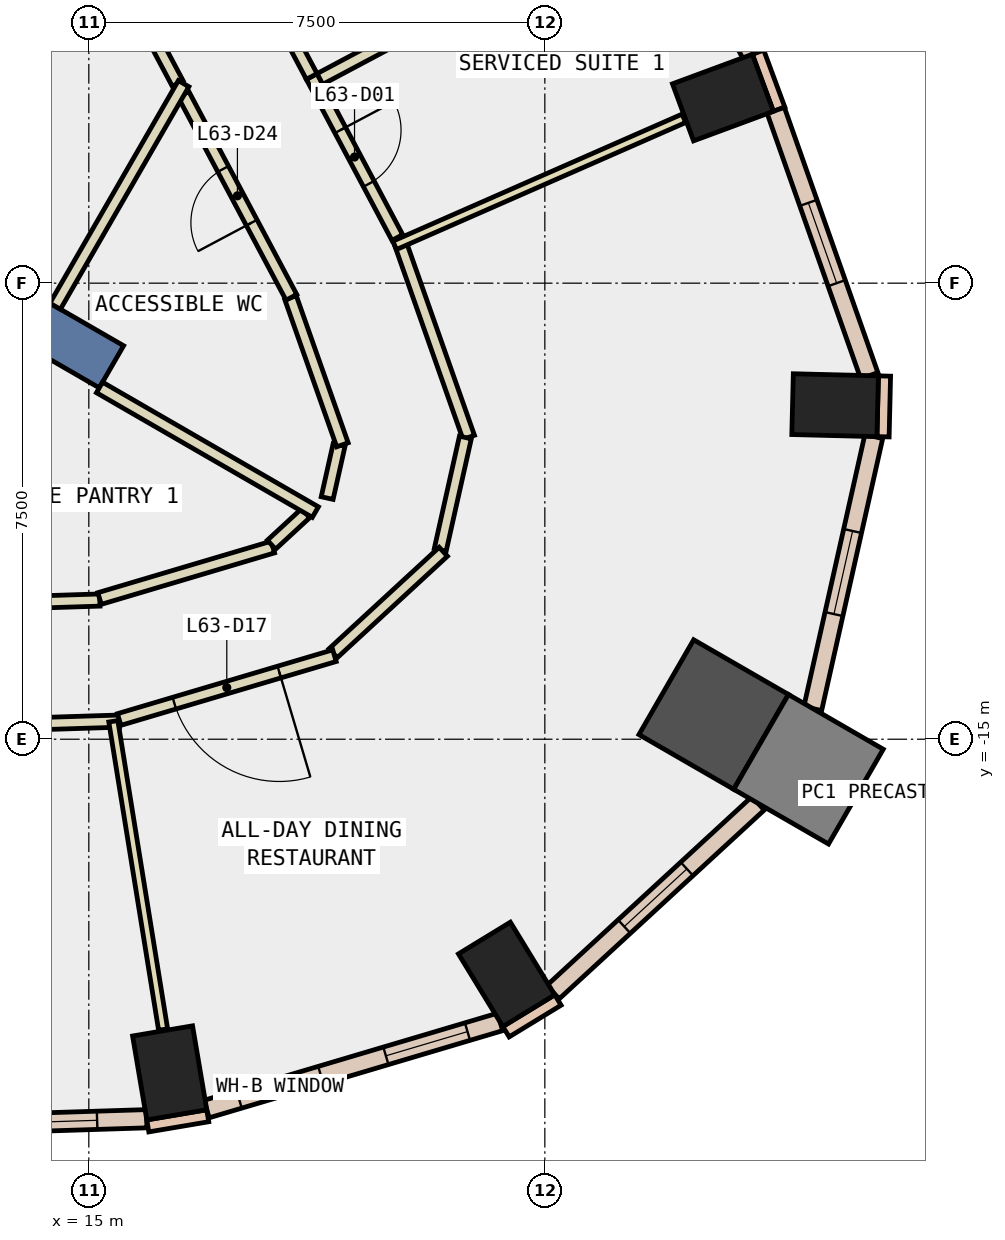
"""IFC4 building model, lengths in metres.
Left out: names, types, materials, properties, quantities, classifications, styles, units other than length and angle.
Written with IfcOpenShell. Run it as: python <this file> out.ifc"""

import sys

from ifc_helpers import new_model, si_unit, direction, frame, frame_2d, origin, origin_2d, place, context, subcontext, project, spatial, rectangle, extrude, element, fill, save


model = new_model("IFC4")
c1 = context("Model", 3, precision=1e-05, world=origin(), true_north=direction((0.0, 1.0)))
c2 = subcontext(c1, "Body", "Model", "MODEL_VIEW")
j1 = project(units=[si_unit("LENGTHUNIT", "METRE"), si_unit("PLANEANGLEUNIT", "RADIAN")], contexts=[c1])
p1 = place(None, origin())
s1 = spatial("IfcSite", under=j1, at=p1, CompositionType="ELEMENT")
p2 = place(p1, origin())
s2 = spatial("IfcBuilding", under=s1, at=p2, CompositionType="ELEMENT")
p3 = place(p2, frame((0.0, 0.0, 273.8)))
s3 = spatial("IfcBuildingStorey", under=s2, at=p3, CompositionType="ELEMENT", Elevation=273.8)
for number, where, z_axis, x_axis in (
    (1, (16.33, -20.487, -0.34), (0.0, 0.0, 1.0), (0.986, 0.167, 0.0)),
    (2, (21.871, -18.867, -0.34), (0.0, 0.0, 1.0), (0.853, 0.521, 0.0)),
):
    element("IfcColumn", number, at=place(p3, frame(where, z_axis=z_axis, x_axis=x_axis)), inside=s3, PredefinedType="COLUMN", context=c2, shape_type="SweptSolid", body=[
        extrude(rectangle(XDim=1.0, YDim=1.4, at=origin_2d()), origin(), (0.0, 0.0, 1.0), 3.6),
    ])
p4 = place(p3, frame((25.277, -14.594, -0.34), z_axis=(0.0, 0.0, 1.0), x_axis=(-0.866025403784, 0.5, 0.0)))
e3 = element("IfcColumn", 3, at=p4, inside=s3, PredefinedType="COLUMN", context=c2, shape_type="SweptSolid", body=[
    extrude(rectangle(XDim=1.8, YDim=1.8, at=origin_2d()), origin(), (0.0, 0.0, 1.0), 3.6),
])
for number, where, z_axis, x_axis in (
    (4, (27.274, -9.507, -0.34), (0.0, 0.0, 1.0), (0.025, 1.0, 0.0)),
    (5, (25.429, -4.448, -0.34), (0.0, 0.0, 1.0), (-0.347, 0.938, 0.0)),
):
    element("IfcColumn", number, at=place(p3, frame(where, z_axis=z_axis, x_axis=x_axis)), inside=s3, PredefinedType="COLUMN", context=c2, shape_type="SweptSolid", body=[
        extrude(rectangle(XDim=1.0, YDim=1.4, at=origin_2d()), origin(), (0.0, 0.0, 1.0), 3.6),
    ])
p5 = place(p3, frame((26.836, -15.494, -0.34), z_axis=(0.0, 0.0, 1.0), x_axis=(-0.866025403784, 0.5, 0.0)))
e6 = element("IfcColumn", 6, at=p5, inside=s3, PredefinedType="COLUMN", context=c2, shape_type="SweptSolid", body=[
    extrude(rectangle(XDim=1.8, YDim=1.8, at=origin_2d()), origin(), (0.0, 0.0, 1.0), 3.6),
])
p6 = place(p3, frame((7.578, -4.375, -0.34), z_axis=(0.0, 0.0, 1.0), x_axis=(0.866024315419, -0.5000018851, 0.0)))
e7 = element("IfcWall", 7, at=p6, inside=s3, PredefinedType="SHEAR", context=c2, shape_type="SweptSolid", body=[
    extrude(rectangle(XDim=9.0, YDim=0.8, at=frame_2d((4.5, 0.0))), origin(), (0.0, 0.0, 1.0), 3.6),
])
p7 = place(p3, frame((26.353, -4.64, 0.0), z_axis=(0.0, 0.0, 1.0), x_axis=(-0.346892928577, 0.937904737222, 0.0)))
e8 = element("IfcWall", 8, at=p7, inside=s3, PredefinedType="STANDARD", context=c2, shape_type="SweptSolid", body=[
    extrude(rectangle(XDim=1.0, YDim=0.2, at=frame_2d((0.5, 0.0))), origin(), (0.0, 0.0, 1.0), 3.26),
])
p8 = place(p3, frame((15.97, -21.359, 0.0), z_axis=(0.0, 0.0, 1.0), x_axis=(0.985961725342, 0.166971483074, 0.0)))
e9 = element("IfcWall", 9, at=p8, inside=s3, PredefinedType="STANDARD", context=c2, shape_type="SweptSolid", body=[
    extrude(rectangle(XDim=1.0, YDim=0.2, at=frame_2d((0.5, 0.0))), origin(), (0.0, 0.0, 1.0), 3.26),
])
p9 = place(p3, frame((21.861, -19.81, 0.0), z_axis=(0.0, 0.0, 1.0), x_axis=(0.853679739553, 0.520798331677, 0.0)))
e10 = element("IfcWall", 10, at=p9, inside=s3, PredefinedType="STANDARD", context=c2, shape_type="SweptSolid", body=[
    extrude(rectangle(XDim=1.0, YDim=0.2, at=frame_2d((0.5, 0.0))), origin(), (0.0, 0.0, 1.0), 3.26),
])
p10 = place(p3, frame((28.062, -10.026, 0.0), z_axis=(0.0, 0.0, 1.0), x_axis=(0.023948152966, 0.999713201858, 0.0)))
e11 = element("IfcWall", 11, at=p10, inside=s3, PredefinedType="STANDARD", context=c2, shape_type="SweptSolid", body=[
    extrude(rectangle(XDim=0.999, YDim=0.2, at=frame_2d((0.5, 0.0))), origin(), (0.0, 0.0, 1.0), 3.26),
])
p11 = place(p3, frame((8.296, -21.484, 0.0), z_axis=(0.0, 0.0, 1.0), x_axis=(0.999496876383, 0.031717410046, 0.0)))
e12 = element("IfcWall", 12, at=p11, inside=s3, PredefinedType="STANDARD", context=c2, shape_type="SweptSolid", body=[
    extrude(rectangle(XDim=7.659, YDim=0.3, at=frame_2d((3.83, 0.0))), origin(), (0.0, 0.0, 1.0), 3.26),
])
p12 = place(p11, frame((0.815, 0.0, 0.9)))
e13 = element("IfcOpeningElement", 13, at=p12, cuts=e12, PredefinedType="OPENING", context=c2, shape_type="SweptSolid", body=[
    extrude(rectangle(XDim=2.2, YDim=2.0, at=frame_2d((1.1, 1.0))), frame((0.0, 0.16, 0.0), z_axis=(0.0, -1.0, 0.0), x_axis=(1.0, 0.0, 0.0)), (0.0, 0.0, 1.0), 0.32),
])
p13 = place(p11, frame((4.644, 0.0, 0.9)))
e14 = element("IfcOpeningElement", 14, at=p13, cuts=e12, PredefinedType="OPENING", context=c2, shape_type="SweptSolid", body=[
    extrude(rectangle(XDim=2.2, YDim=2.0, at=frame_2d((1.1, 1.0))), frame((0.0, 0.16, 0.0), z_axis=(0.0, -1.0, 0.0), x_axis=(1.0, 0.0, 0.0)), (0.0, 0.0, 1.0), 0.32),
])
p14 = place(p3, frame((16.937, -21.082, 0.0), z_axis=(0.0, 0.0, 1.0), x_axis=(0.95864045837, 0.284619872067, 0.0)))
e15 = element("IfcWall", 15, at=p14, inside=s3, PredefinedType="STANDARD", context=c2, shape_type="SweptSolid", body=[
    extrude(rectangle(XDim=5.035, YDim=0.3, at=frame_2d((2.518, 0.0))), origin(), (0.0, 0.0, 1.0), 3.26),
])
p15 = place(p14, frame((0.559, 0.0, 0.9)))
e16 = element("IfcOpeningElement", 16, at=p15, cuts=e15, PredefinedType="OPENING", context=c2, shape_type="SweptSolid", body=[
    extrude(rectangle(XDim=1.4, YDim=2.0, at=frame_2d((0.7, 1.0))), frame((0.0, 0.16, 0.0), z_axis=(0.0, -1.0, 0.0), x_axis=(1.0, 0.0, 0.0)), (0.0, 0.0, 1.0), 0.32),
])
p16 = place(p14, frame((3.076, 0.0, 0.9)))
e17 = element("IfcOpeningElement", 17, at=p16, cuts=e15, PredefinedType="OPENING", context=c2, shape_type="SweptSolid", body=[
    extrude(rectangle(XDim=1.4, YDim=2.0, at=frame_2d((0.7, 1.0))), frame((0.0, 0.16, 0.0), z_axis=(0.0, -1.0, 0.0), x_axis=(1.0, 0.0, 0.0)), (0.0, 0.0, 1.0), 0.32),
])
p17 = place(p3, frame((22.634, -19.16, 0.0), z_axis=(0.0, 0.0, 1.0), x_axis=(0.735631679486, 0.677381747714, 0.0)))
e18 = element("IfcWall", 18, at=p17, inside=s3, PredefinedType="STANDARD", context=c2, shape_type="SweptSolid", body=[
    extrude(rectangle(XDim=4.585, YDim=0.3, at=frame_2d((2.292, 0.0))), origin(), (0.0, 0.0, 1.0), 3.26),
])
p18 = place(p17, frame((1.593, 0.0, 0.9)))
e19 = element("IfcOpeningElement", 19, at=p18, cuts=e18, PredefinedType="OPENING", context=c2, shape_type="SweptSolid", body=[
    extrude(rectangle(XDim=1.4, YDim=2.0, at=frame_2d((0.7, 1.0))), frame((0.0, 0.16, 0.0), z_axis=(0.0, -1.0, 0.0), x_axis=(1.0, 0.0, 0.0)), (0.0, 0.0, 1.0), 0.32),
])
p19 = place(p3, frame((26.906, -14.496, 0.0), z_axis=(0.0, 0.0, 1.0), x_axis=(0.218936963279, 0.975739005119, 0.0)))
e20 = element("IfcWall", 20, at=p19, inside=s3, PredefinedType="STANDARD", context=c2, shape_type="SweptSolid", body=[
    extrude(rectangle(XDim=4.585, YDim=0.3, at=frame_2d((2.293, 0.0))), origin(), (0.0, 0.0, 1.0), 3.26),
])
p20 = place(p19, frame((1.593, 0.0, 0.9)))
e21 = element("IfcOpeningElement", 21, at=p20, cuts=e20, PredefinedType="OPENING", context=c2, shape_type="SweptSolid", body=[
    extrude(rectangle(XDim=1.4, YDim=2.0, at=frame_2d((0.7, 1.0))), frame((0.0, 0.16, 0.0), z_axis=(0.0, -1.0, 0.0), x_axis=(1.0, 0.0, 0.0)), (0.0, 0.0, 1.0), 0.32),
])
p21 = place(p3, frame((27.836, -9.021, 0.0), z_axis=(0.0, 0.0, 1.0), x_axis=(-0.332491532378, 0.943106240514, 0.0)))
e22 = element("IfcWall", 22, at=p21, inside=s3, PredefinedType="STANDARD", context=c2, shape_type="SweptSolid", body=[
    extrude(rectangle(XDim=4.625, YDim=0.3, at=frame_2d((2.312, 0.0))), origin(), (0.0, 0.0, 1.0), 3.26),
])
p22 = place(p21, frame((1.613, 0.0, 0.9)))
e23 = element("IfcOpeningElement", 23, at=p22, cuts=e22, PredefinedType="OPENING", context=c2, shape_type="SweptSolid", body=[
    extrude(rectangle(XDim=1.4, YDim=2.0, at=frame_2d((0.7, 1.0))), frame((0.0, 0.16, 0.0), z_axis=(0.0, -1.0, 0.0), x_axis=(1.0, 0.0, 0.0)), (0.0, 0.0, 1.0), 0.32),
])
p23 = place(p3, frame((25.895, -3.744, 0.0), z_axis=(0.0, 0.0, 1.0), x_axis=(-0.469691596427, 0.882830563724, 0.0)))
e24 = element("IfcWall", 24, at=p23, inside=s3, PredefinedType="STANDARD", context=c2, shape_type="SweptSolid", body=[
    extrude(rectangle(XDim=5.768, YDim=0.3, at=frame_2d((2.884, 0.0))), origin(), (0.0, 0.0, 1.0), 3.26),
])
p24 = place(p23, frame((0.492, 0.0, 0.9)))
e25 = element("IfcOpeningElement", 25, at=p24, cuts=e24, PredefinedType="OPENING", context=c2, shape_type="SweptSolid", body=[
    extrude(rectangle(XDim=1.9, YDim=2.0, at=frame_2d((0.95, 1.0))), frame((0.0, 0.16, 0.0), z_axis=(0.0, -1.0, 0.0), x_axis=(1.0, 0.0, 0.0)), (0.0, 0.0, 1.0), 0.32),
])
p25 = place(p23, frame((3.376, 0.0, 0.9)))
e26 = element("IfcOpeningElement", 26, at=p25, cuts=e24, PredefinedType="OPENING", context=c2, shape_type="SweptSolid", body=[
    extrude(rectangle(XDim=1.9, YDim=2.0, at=frame_2d((0.95, 1.0))), frame((0.0, 0.16, 0.0), z_axis=(0.0, -1.0, 0.0), x_axis=(1.0, 0.0, 0.0)), (0.0, 0.0, 1.0), 0.32),
])
p26 = place(p3, frame((16.462, -4.217, 0.0), z_axis=(0.0, 0.0, 1.0), x_axis=(-0.469436447461, 0.882966263113, 0.0)))
e27 = element("IfcWall", 27, at=p26, inside=s3, PredefinedType="PARTITIONING", context=c2, shape_type="SweptSolid", body=[
    extrude(rectangle(XDim=2.179, YDim=0.2, at=frame_2d((1.09, 0.0))), origin(), (0.0, 0.0, 1.0), 3.26),
])
p27 = place(p3, frame((11.665, -12.823, 0.0), z_axis=(0.0, 0.0, 1.0), x_axis=(0.99949244941, 0.03185660956, 0.0)))
e28 = element("IfcWall", 28, at=p27, inside=s3, PredefinedType="PARTITIONING", context=c2, shape_type="SweptSolid", body=[
    extrude(rectangle(XDim=3.518, YDim=0.2, at=frame_2d((1.759, 0.0))), origin(), (0.0, 0.0, 1.0), 3.26),
])
p28 = place(p27, frame((1.259, 0.0, 0.0)))
e29 = element("IfcOpeningElement", 29, at=p28, cuts=e28, PredefinedType="OPENING", context=c2, shape_type="SweptSolid", body=[
    extrude(rectangle(XDim=1.0, YDim=2.1, at=frame_2d((0.5, 1.05))), frame((0.0, 0.11, 0.0), z_axis=(0.0, -1.0, 0.0), x_axis=(1.0, 0.0, 0.0)), (0.0, 0.0, 1.0), 0.22),
])
p29 = place(p3, frame((15.177, -12.686, 0.0), z_axis=(0.0, 0.0, 1.0), x_axis=(0.958629704259, 0.284656090947, 0.0)))
e30 = element("IfcWall", 30, at=p29, inside=s3, PredefinedType="PARTITIONING", context=c2, shape_type="SweptSolid", body=[
    extrude(rectangle(XDim=2.972, YDim=0.2, at=frame_2d((1.486, 0.0))), origin(), (0.0, 0.0, 1.0), 3.26),
])
p30 = place(p3, frame((18.004, -11.801, 0.0), z_axis=(0.0, 0.0, 1.0), x_axis=(0.735268601872, 0.677775835436, 0.0)))
e31 = element("IfcWall", 31, at=p30, inside=s3, PredefinedType="PARTITIONING", context=c2, shape_type="SweptSolid", body=[
    extrude(rectangle(XDim=0.764, YDim=0.2, at=frame_2d((0.382, 0.0))), origin(), (0.0, 0.0, 1.0), 3.26),
])
p31 = place(p3, frame((18.92, -11.034, 0.0), z_axis=(0.0, 0.0, 1.0), x_axis=(0.219096654714, 0.975703159723, 0.0)))
e32 = element("IfcWall", 32, at=p31, inside=s3, PredefinedType="PARTITIONING", context=c2, shape_type="SweptSolid", body=[
    extrude(rectangle(XDim=0.895, YDim=0.2, at=frame_2d((0.447, 0.0))), origin(), (0.0, 0.0, 1.0), 3.26),
])
p32 = place(p3, frame((19.171, -10.158, 0.0), z_axis=(0.0, 0.0, 1.0), x_axis=(-0.332486504777, 0.943108012977, 0.0)))
e33 = element("IfcWall", 33, at=p32, inside=s3, PredefinedType="PARTITIONING", context=c2, shape_type="SweptSolid", body=[
    extrude(rectangle(XDim=2.565, YDim=0.2, at=frame_2d((1.282, 0.0))), origin(), (0.0, 0.0, 1.0), 3.26),
])
p33 = place(p3, frame((18.332, -7.733, 0.0), z_axis=(0.0, 0.0, 1.0), x_axis=(-0.469639737924, 0.882858152006, 0.0)))
e34 = element("IfcWall", 34, at=p33, inside=s3, PredefinedType="PARTITIONING", context=c2, shape_type="SweptSolid", body=[
    extrude(rectangle(XDim=3.782, YDim=0.2, at=frame_2d((1.891, 0.0))), origin(), (0.0, 0.0, 1.0), 3.26),
])
p34 = place(p33, frame((1.391, 0.0, 0.0)))
e35 = element("IfcOpeningElement", 35, at=p34, cuts=e34, PredefinedType="OPENING", context=c2, shape_type="SweptSolid", body=[
    extrude(rectangle(XDim=1.0, YDim=2.1, at=frame_2d((0.5, 1.05))), frame((0.0, 0.11, 0.0), z_axis=(0.0, -1.0, 0.0), x_axis=(1.0, 0.0, 0.0)), (0.0, 0.0, 1.0), 0.22),
])
p35 = place(p3, frame((15.503, -14.702, 0.0), z_axis=(0.0, 0.0, 1.0), x_axis=(-0.999495120537, -0.031772693047, 0.0)))
e36 = element("IfcWall", 36, at=p35, inside=s3, PredefinedType="PARTITIONING", context=c2, shape_type="SweptSolid", body=[
    extrude(rectangle(XDim=7.807, YDim=0.2, at=frame_2d((3.903, 0.0))), origin(), (0.0, 0.0, 1.0), 3.26),
])
p36 = place(p35, frame((3.403, 0.0, 0.0)))
e37 = element("IfcOpeningElement", 37, at=p36, cuts=e36, PredefinedType="OPENING", context=c2, shape_type="SweptSolid", body=[
    extrude(rectangle(XDim=1.0, YDim=2.1, at=frame_2d((0.5, 1.05))), frame((0.0, 0.11, 0.0), z_axis=(0.0, -1.0, 0.0), x_axis=(1.0, 0.0, 0.0)), (0.0, 0.0, 1.0), 0.22),
])
p37 = place(p3, frame((20.113, -6.814, 0.0), z_axis=(0.0, 0.0, 1.0), x_axis=(0.332352648366, -0.943155192492, 0.0)))
e38 = element("IfcWall", 38, at=p37, inside=s3, PredefinedType="PARTITIONING", context=c2, shape_type="SweptSolid", body=[
    extrude(rectangle(XDim=3.415, YDim=0.2, at=frame_2d((1.708, 0.0))), origin(), (0.0, 0.0, 1.0), 3.26),
])
p38 = place(p3, frame((21.193, -10.038, 0.0), z_axis=(0.0, 0.0, 1.0), x_axis=(-0.218540107266, -0.975827967173, 0.0)))
e39 = element("IfcWall", 39, at=p38, inside=s3, PredefinedType="PARTITIONING", context=c2, shape_type="SweptSolid", body=[
    extrude(rectangle(XDim=1.895, YDim=0.2, at=frame_2d((0.947, 0.0))), origin(), (0.0, 0.0, 1.0), 3.26),
])
p39 = place(p3, frame((20.83, -11.917, 0.0), z_axis=(0.0, 0.0, 1.0), x_axis=(-0.735547704352, -0.67747293276, 0.0)))
e40 = element("IfcWall", 40, at=p39, inside=s3, PredefinedType="PARTITIONING", context=c2, shape_type="SweptSolid", body=[
    extrude(rectangle(XDim=2.463, YDim=0.2, at=frame_2d((1.232, 0.0))), origin(), (0.0, 0.0, 1.0), 3.26),
])
p40 = place(p3, frame((19.04, -13.626, 0.0), z_axis=(0.0, 0.0, 1.0), x_axis=(-0.958734738219, -0.284302131073, 0.0)))
e41 = element("IfcWall", 41, at=p40, inside=s3, PredefinedType="PARTITIONING", context=c2, shape_type="SweptSolid", body=[
    extrude(rectangle(XDim=3.693, YDim=0.2, at=frame_2d((1.847, 0.0))), origin(), (0.0, 0.0, 1.0), 3.26),
])
p41 = place(p40, frame((0.947, 0.0, 0.0)))
e42 = element("IfcOpeningElement", 42, at=p41, cuts=e41, PredefinedType="OPENING", context=c2, shape_type="SweptSolid", body=[
    extrude(rectangle(XDim=1.8, YDim=2.1, at=frame_2d((0.9, 1.05))), frame((0.0, 0.11, 0.0), z_axis=(0.0, -1.0, 0.0), x_axis=(1.0, 0.0, 0.0)), (0.0, 0.0, 1.0), 0.22),
])
p42 = place(p3, frame((18.666, -4.101, 0.0), z_axis=(0.0, 0.0, 1.0), x_axis=(0.469341661158, -0.883016650523, 0.0)))
e43 = element("IfcWall", 43, at=p42, inside=s3, PredefinedType="PARTITIONING", context=c2, shape_type="SweptSolid", body=[
    extrude(rectangle(XDim=3.0, YDim=0.2, at=frame_2d((1.5, 0.0))), origin(), (0.0, 0.0, 1.0), 3.26),
])
p43 = place(p42, frame((1.0, 0.0, 0.0)))
e44 = element("IfcOpeningElement", 44, at=p43, cuts=e43, PredefinedType="OPENING", context=c2, shape_type="SweptSolid", body=[
    extrude(rectangle(XDim=1.0, YDim=2.1, at=frame_2d((0.5, 1.05))), frame((0.0, 0.11, 0.0), z_axis=(0.0, -1.0, 0.0), x_axis=(1.0, 0.0, 0.0)), (0.0, 0.0, 1.0), 0.22),
])
p44 = place(p3, frame((17.257, -1.452, 0.0), z_axis=(0.0, 0.0, 1.0), x_axis=(0.469561695117, -0.882899662747, 0.0)))
e45 = element("IfcWall", 45, at=p44, inside=s3, PredefinedType="PARTITIONING", context=c2, shape_type="SweptSolid", body=[
    extrude(rectangle(XDim=3.0, YDim=0.2, at=frame_2d((1.5, 0.0))), origin(), (0.0, 0.0, 1.0), 3.26),
])
p45 = place(p3, frame((16.559, -4.219, 0.0), z_axis=(0.0, 0.0, 1.0), x_axis=(-0.499997491977, -0.866026851788, 0.0)))
e46 = element("IfcWall", 46, at=p45, inside=s3, PredefinedType="PARTITIONING", context=c2, shape_type="SweptSolid", body=[
    extrude(rectangle(XDim=4.226, YDim=0.2, at=frame_2d((2.113, 0.0))), origin(), (0.0, 0.0, 1.0), 3.26),
])
p46 = place(p3, frame((15.176, -9.215, 0.0), z_axis=(0.0, 0.0, 1.0), x_axis=(0.866006068523, -0.500033488159, 0.0)))
e47 = element("IfcWall", 47, at=p46, inside=s3, PredefinedType="PARTITIONING", context=c2, shape_type="SweptSolid", body=[
    extrude(rectangle(XDim=4.099, YDim=0.2, at=frame_2d((2.05, 0.0))), origin(), (0.0, 0.0, 1.0), 3.26),
])
p47 = place(p3, frame((15.403, -14.705, 0.0), z_axis=(0.0, 0.0, 1.0), x_axis=(0.159447664828, -0.98720638277, 0.0)))
e48 = element("IfcWall", 48, at=p47, inside=s3, PredefinedType="PARTITIONING", context=c2, shape_type="SweptSolid", body=[
    extrude(rectangle(XDim=5.135, YDim=0.15, at=frame_2d((2.568, 0.0))), origin(), (0.0, 0.0, 1.0), 3.26),
])
p48 = place(p3, frame((20.03, -6.878, 0.0), z_axis=(0.0, 0.0, 1.0), x_axis=(0.915616185053, 0.402053481104, 0.0)))
e49 = element("IfcWall", 49, at=p48, inside=s3, PredefinedType="PARTITIONING", context=c2, shape_type="SweptSolid", body=[
    extrude(rectangle(XDim=5.196, YDim=0.15, at=frame_2d((2.598, 0.0))), origin(), (0.0, 0.0, 1.0), 3.26),
])
p49 = place(p3, frame((18.801, -4.142, 0.0), z_axis=(0.0, 0.0, 1.0), x_axis=(0.882850852072, 0.469653460539, 0.0)))
e50 = element("IfcWall", 50, at=p49, inside=s3, PredefinedType="PARTITIONING", context=c2, shape_type="SweptSolid", body=[
    extrude(rectangle(XDim=2.4, YDim=0.2, at=frame_2d((1.2, 0.0))), origin(), (0.0, 0.0, 1.0), 3.26),
])
p50 = place(p13, origin())
e51 = element("IfcWindow", 51, at=p50, inside=s3, PartitioningType="SINGLE_PANEL", PredefinedType="WINDOW", context=c2, shape_type="SweptSolid", body=[
    extrude(rectangle(XDim=2.2, YDim=2.0, at=frame_2d((1.1, 1.0))), frame((0.0, 0.03, 0.0), z_axis=(0.0, -1.0, 0.0), x_axis=(1.0, 0.0, 0.0)), (0.0, 0.0, 1.0), 0.06),
])
fill(e14, e51)
p51 = place(p15, origin())
e52 = element("IfcWindow", 52, at=p51, inside=s3, PartitioningType="SINGLE_PANEL", PredefinedType="WINDOW", context=c2, shape_type="SweptSolid", body=[
    extrude(rectangle(XDim=1.4, YDim=2.0, at=frame_2d((0.7, 1.0))), frame((0.0, 0.03, 0.0), z_axis=(0.0, -1.0, 0.0), x_axis=(1.0, 0.0, 0.0)), (0.0, 0.0, 1.0), 0.06),
])
fill(e16, e52)
p52 = place(p16, origin())
e53 = element("IfcWindow", 53, at=p52, inside=s3, PartitioningType="SINGLE_PANEL", PredefinedType="WINDOW", context=c2, shape_type="SweptSolid", body=[
    extrude(rectangle(XDim=1.4, YDim=2.0, at=frame_2d((0.7, 1.0))), frame((0.0, 0.03, 0.0), z_axis=(0.0, -1.0, 0.0), x_axis=(1.0, 0.0, 0.0)), (0.0, 0.0, 1.0), 0.06),
])
fill(e17, e53)
p53 = place(p18, origin())
e54 = element("IfcWindow", 54, at=p53, inside=s3, PartitioningType="SINGLE_PANEL", PredefinedType="WINDOW", context=c2, shape_type="SweptSolid", body=[
    extrude(rectangle(XDim=1.4, YDim=2.0, at=frame_2d((0.7, 1.0))), frame((0.0, 0.03, 0.0), z_axis=(0.0, -1.0, 0.0), x_axis=(1.0, 0.0, 0.0)), (0.0, 0.0, 1.0), 0.06),
])
fill(e19, e54)
p54 = place(p20, origin())
e55 = element("IfcWindow", 55, at=p54, inside=s3, PartitioningType="SINGLE_PANEL", PredefinedType="WINDOW", context=c2, shape_type="SweptSolid", body=[
    extrude(rectangle(XDim=1.4, YDim=2.0, at=frame_2d((0.7, 1.0))), frame((0.0, 0.03, 0.0), z_axis=(0.0, -1.0, 0.0), x_axis=(1.0, 0.0, 0.0)), (0.0, 0.0, 1.0), 0.06),
])
fill(e21, e55)
p55 = place(p22, origin())
e56 = element("IfcWindow", 56, at=p55, inside=s3, PartitioningType="SINGLE_PANEL", PredefinedType="WINDOW", context=c2, shape_type="SweptSolid", body=[
    extrude(rectangle(XDim=1.4, YDim=2.0, at=frame_2d((0.7, 1.0))), frame((0.0, 0.03, 0.0), z_axis=(0.0, -1.0, 0.0), x_axis=(1.0, 0.0, 0.0)), (0.0, 0.0, 1.0), 0.06),
])
fill(e23, e56)
p56 = place(p43, origin())
e57 = element("IfcDoor", 57, at=p56, inside=s3, OperationType="SINGLE_SWING_LEFT", PredefinedType="DOOR", context=c2, shape_type="SweptSolid", body=[
    extrude(rectangle(XDim=1.0, YDim=2.1, at=frame_2d((0.5, 1.05))), frame((0.0, 0.025, 0.0), z_axis=(0.0, -1.0, 0.0), x_axis=(1.0, 0.0, 0.0)), (0.0, 0.0, 1.0), 0.05),
])
fill(e44, e57)
p57 = place(p41, origin())
e58 = element("IfcDoor", 58, at=p57, inside=s3, OperationType="DOUBLE_DOOR_SINGLE_SWING", PredefinedType="DOOR", context=c2, shape_type="SweptSolid", body=[
    extrude(rectangle(XDim=1.8, YDim=2.1, at=frame_2d((0.9, 1.05))), frame((0.0, 0.025, 0.0), z_axis=(0.0, -1.0, 0.0), x_axis=(1.0, 0.0, 0.0)), (0.0, 0.0, 1.0), 0.05),
])
fill(e42, e58)
p58 = place(p34, origin())
e59 = element("IfcDoor", 59, at=p58, inside=s3, OperationType="SINGLE_SWING_RIGHT", PredefinedType="DOOR", context=c2, shape_type="SweptSolid", body=[
    extrude(rectangle(XDim=1.0, YDim=2.1, at=frame_2d((0.5, 1.05))), frame((0.0, 0.025, 0.0), z_axis=(0.0, -1.0, 0.0), x_axis=(1.0, 0.0, 0.0)), (0.0, 0.0, 1.0), 0.05),
])
fill(e35, e59)
save(model, sys.argv[1])
